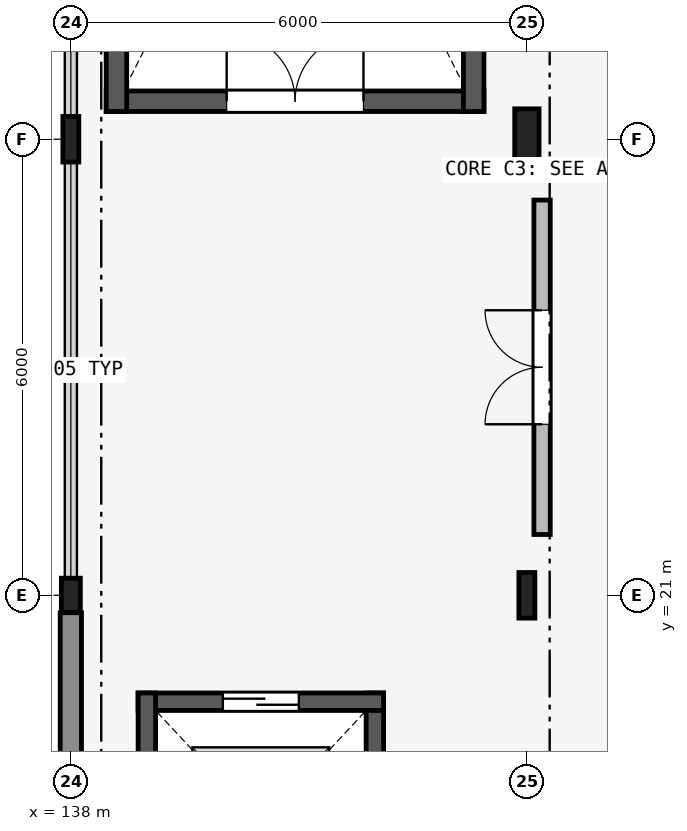
"""IFC4 building model, lengths in metres.
Left out: names, types, materials, properties, quantities, classifications, styles, units other than length and angle.
Written with IfcOpenShell. Run it as: python <this file> out.ifc"""

import sys

from ifc_helpers import new_model, si_unit, direction, frame, frame_2d, origin, origin_2d, place, context, subcontext, project, spatial, rectangle, i_section, extrude, element, fill, save


model = new_model("IFC4")
c1 = context("Model", 3, precision=1e-05, world=origin(), true_north=direction((0.0, 1.0)))
c2 = subcontext(c1, "Body", "Model", "MODEL_VIEW")
j1 = project(units=[si_unit("LENGTHUNIT", "METRE"), si_unit("PLANEANGLEUNIT", "RADIAN")], contexts=[c1])
p1 = place(None, origin())
s1 = spatial("IfcSite", under=j1, at=p1, CompositionType="ELEMENT")
p2 = place(p1, origin())
s2 = spatial("IfcBuilding", under=s1, at=p2, CompositionType="ELEMENT")
p3 = place(p2, frame((0.0, 0.0, 13.5)))
s3 = spatial("IfcBuildingStorey", under=s2, at=p3, CompositionType="ELEMENT", Elevation=13.5)
p4 = place(p3, frame((138.0, 21.0, 0.0), z_axis=(0.0, 0.0, 1.0), x_axis=(1.0, 0.0, 0.0)))
e1 = element("IfcColumn", 1, at=p4, inside=s3, PredefinedType="COLUMN", context=c2, shape_type="SweptSolid", body=[
    extrude(i_section(OverallWidth=0.25, OverallDepth=0.45, WebThickness=0.011, FlangeThickness=0.014, FilletRadius=0.015, at=origin_2d()), origin(), (0.0, 0.0, 1.0), 4.5),
])
for number, where, z_axis, x_axis in (
    (2, (138.0, 27.0, 0.0), (0.0, 0.0, 1.0), (1.0, 0.0, 0.0)),
    (3, (144.0, 21.0, 0.0), (0.0, 0.0, 1.0), (1.0, 0.0, 0.0)),
):
    element("IfcColumn", number, at=place(p3, frame(where, z_axis=z_axis, x_axis=x_axis)), inside=s3, PredefinedType="COLUMN", context=c2, shape_type="SweptSolid", body=[
        extrude(i_section(OverallWidth=0.21, OverallDepth=0.6, WebThickness=0.012, FlangeThickness=0.021, FilletRadius=0.02, at=origin_2d()), origin(), (0.0, 0.0, 1.0), 4.5),
    ])
p5 = place(p3, frame((144.0, 27.0, 0.0), z_axis=(0.0, 0.0, 1.0), x_axis=(1.0, 0.0, 0.0)))
e4 = element("IfcColumn", 4, at=p5, inside=s3, PredefinedType="COLUMN", context=c2, shape_type="SweptSolid", body=[
    extrude(i_section(OverallWidth=0.32, OverallDepth=0.8, WebThickness=0.016, FlangeThickness=0.028, at=origin_2d()), origin(), (0.0, 0.0, 1.0), 4.5),
])
p6 = place(p3, frame((138.0, 15.404, 0.0), z_axis=(0.0, 0.0, 1.0), x_axis=(0.0, 1.0, 0.0)))
e5 = element("IfcWall", 5, at=p6, inside=s3, PredefinedType="SOLIDWALL", context=c2, shape_type="SweptSolid", body=[
    extrude(rectangle(XDim=5.367, YDim=0.28, at=frame_2d((2.684, 0.0))), origin(), (0.0, 0.0, 1.0), 3.64),
])
p7 = place(p3, frame((138.465, 27.5, 0.0), z_axis=(0.0, 0.0, 1.0), x_axis=(1.0, 0.0, 0.0)))
e6 = element("IfcWall", 6, at=p7, inside=s3, PredefinedType="SHEAR", context=c2, shape_type="SweptSolid", body=[
    extrude(rectangle(XDim=4.97, YDim=0.27, at=frame_2d((2.485, 0.0))), origin(), (0.0, 0.0, 1.0), 4.36),
])
p8 = place(p7, frame((1.585, 0.0, 0.0)))
e7 = element("IfcOpeningElement", 7, at=p8, cuts=e6, PredefinedType="OPENING", context=c2, shape_type="SweptSolid", body=[
    extrude(rectangle(XDim=1.8, YDim=2.2, at=frame_2d((0.9, 1.1))), frame((0.0, 0.145, 0.0), z_axis=(0.0, -1.0, 0.0), x_axis=(1.0, 0.0, 0.0)), (0.0, 0.0, 1.0), 0.29),
])
for number, where, z_axis, x_axis in (
    (8, (143.3, 27.365, 0.0), (0.0, 0.0, 1.0), (0.0, 1.0, 0.0)),
    (9, (138.6, 36.935, 0.0), (0.0, 0.0, 1.0), (0.0, -1.0, 0.0)),
):
    element("IfcWall", number, at=place(p3, frame(where, z_axis=z_axis, x_axis=x_axis)), inside=s3, PredefinedType="SHEAR", context=c2, shape_type="SweptSolid", body=[
        extrude(rectangle(XDim=9.57, YDim=0.27, at=frame_2d((4.785, 0.0))), origin(), (0.0, 0.0, 1.0), 4.36),
    ])
p9 = place(p3, frame((144.2, 21.8, 0.0), z_axis=(0.0, 0.0, 1.0), x_axis=(0.0, 1.0, 0.0)))
e10 = element("IfcWall", 10, at=p9, inside=s3, PredefinedType="PARTITIONING", context=c2, shape_type="SweptSolid", body=[
    extrude(rectangle(XDim=4.4, YDim=0.215, at=frame_2d((2.2, 0.0))), origin(), (0.0, 0.0, 1.0), 3.79),
])
p10 = place(p9, frame((1.45, 0.0, 0.0)))
e11 = element("IfcOpeningElement", 11, at=p10, cuts=e10, PredefinedType="OPENING", context=c2, shape_type="SweptSolid", body=[
    extrude(rectangle(XDim=1.5, YDim=2.15, at=frame_2d((0.75, 1.075))), frame((0.0, 0.117, 0.0), z_axis=(0.0, -1.0, 0.0), x_axis=(1.0, 0.0, 0.0)), (0.0, 0.0, 1.0), 0.235),
])
p11 = place(p3, frame((142.0, 16.285, 0.0), z_axis=(0.0, 0.0, 1.0), x_axis=(0.0, 1.0, 0.0)))
e12 = element("IfcWall", 12, at=p11, inside=s3, PredefinedType="SHEAR", context=c2, shape_type="SweptSolid", body=[
    extrude(rectangle(XDim=3.43, YDim=0.23, at=frame_2d((1.715, 0.0))), origin(), (0.0, 0.0, 1.0), 4.5),
])
p12 = place(p3, frame((142.115, 19.6, 0.0), z_axis=(0.0, 0.0, 1.0), x_axis=(-1.0, 0.0, 0.0)))
e13 = element("IfcWall", 13, at=p12, inside=s3, PredefinedType="SHEAR", context=c2, shape_type="SweptSolid", body=[
    extrude(rectangle(XDim=3.23, YDim=0.23, at=frame_2d((1.615, 0.0))), origin(), (0.0, 0.0, 1.0), 4.5),
])
p13 = place(p12, frame((1.115, 0.0, 0.0)))
e14 = element("IfcOpeningElement", 14, at=p13, cuts=e13, PredefinedType="OPENING", context=c2, shape_type="SweptSolid", body=[
    extrude(rectangle(XDim=1.0, YDim=2.15, at=frame_2d((0.5, 1.075))), frame((0.0, 0.125, 0.0), z_axis=(0.0, -1.0, 0.0), x_axis=(1.0, 0.0, 0.0)), (0.0, 0.0, 1.0), 0.25),
])
p14 = place(p3, frame((139.0, 19.715, 0.0), z_axis=(0.0, 0.0, 1.0), x_axis=(0.0, -1.0, 0.0)))
e15 = element("IfcWall", 15, at=p14, inside=s3, PredefinedType="SHEAR", context=c2, shape_type="SweptSolid", body=[
    extrude(rectangle(XDim=3.43, YDim=0.23, at=frame_2d((1.715, 0.0))), origin(), (0.0, 0.0, 1.0), 4.5),
])
p15 = place(p8, origin())
e16 = element("IfcDoor", 16, at=p15, inside=s3, OperationType="DOUBLE_DOOR_SINGLE_SWING", PredefinedType="DOOR", context=c2, shape_type="SweptSolid", body=[
    extrude(rectangle(XDim=1.8, YDim=2.2, at=frame_2d((0.9, 1.1))), frame((0.0, 0.025, 0.0), z_axis=(0.0, -1.0, 0.0), x_axis=(1.0, 0.0, 0.0)), (0.0, 0.0, 1.0), 0.05),
])
fill(e7, e16)
p16 = place(p10, origin())
e17 = element("IfcDoor", 17, at=p16, inside=s3, OperationType="DOUBLE_DOOR_SINGLE_SWING", PredefinedType="DOOR", context=c2, shape_type="SweptSolid", body=[
    extrude(rectangle(XDim=1.5, YDim=2.15, at=frame_2d((0.75, 1.075))), frame((0.0, 0.025, 0.0), z_axis=(0.0, -1.0, 0.0), x_axis=(1.0, 0.0, 0.0)), (0.0, 0.0, 1.0), 0.05),
])
fill(e11, e17)
p17 = place(p13, origin())
e18 = element("IfcDoor", 18, at=p17, inside=s3, OperationType="SLIDING_TO_LEFT", PredefinedType="DOOR", context=c2, shape_type="SweptSolid", body=[
    extrude(rectangle(XDim=1.0, YDim=2.15, at=frame_2d((0.5, 1.075))), frame((0.0, 0.025, 0.0), z_axis=(0.0, -1.0, 0.0), x_axis=(1.0, 0.0, 0.0)), (0.0, 0.0, 1.0), 0.05),
])
fill(e14, e18)
save(model, sys.argv[1])
